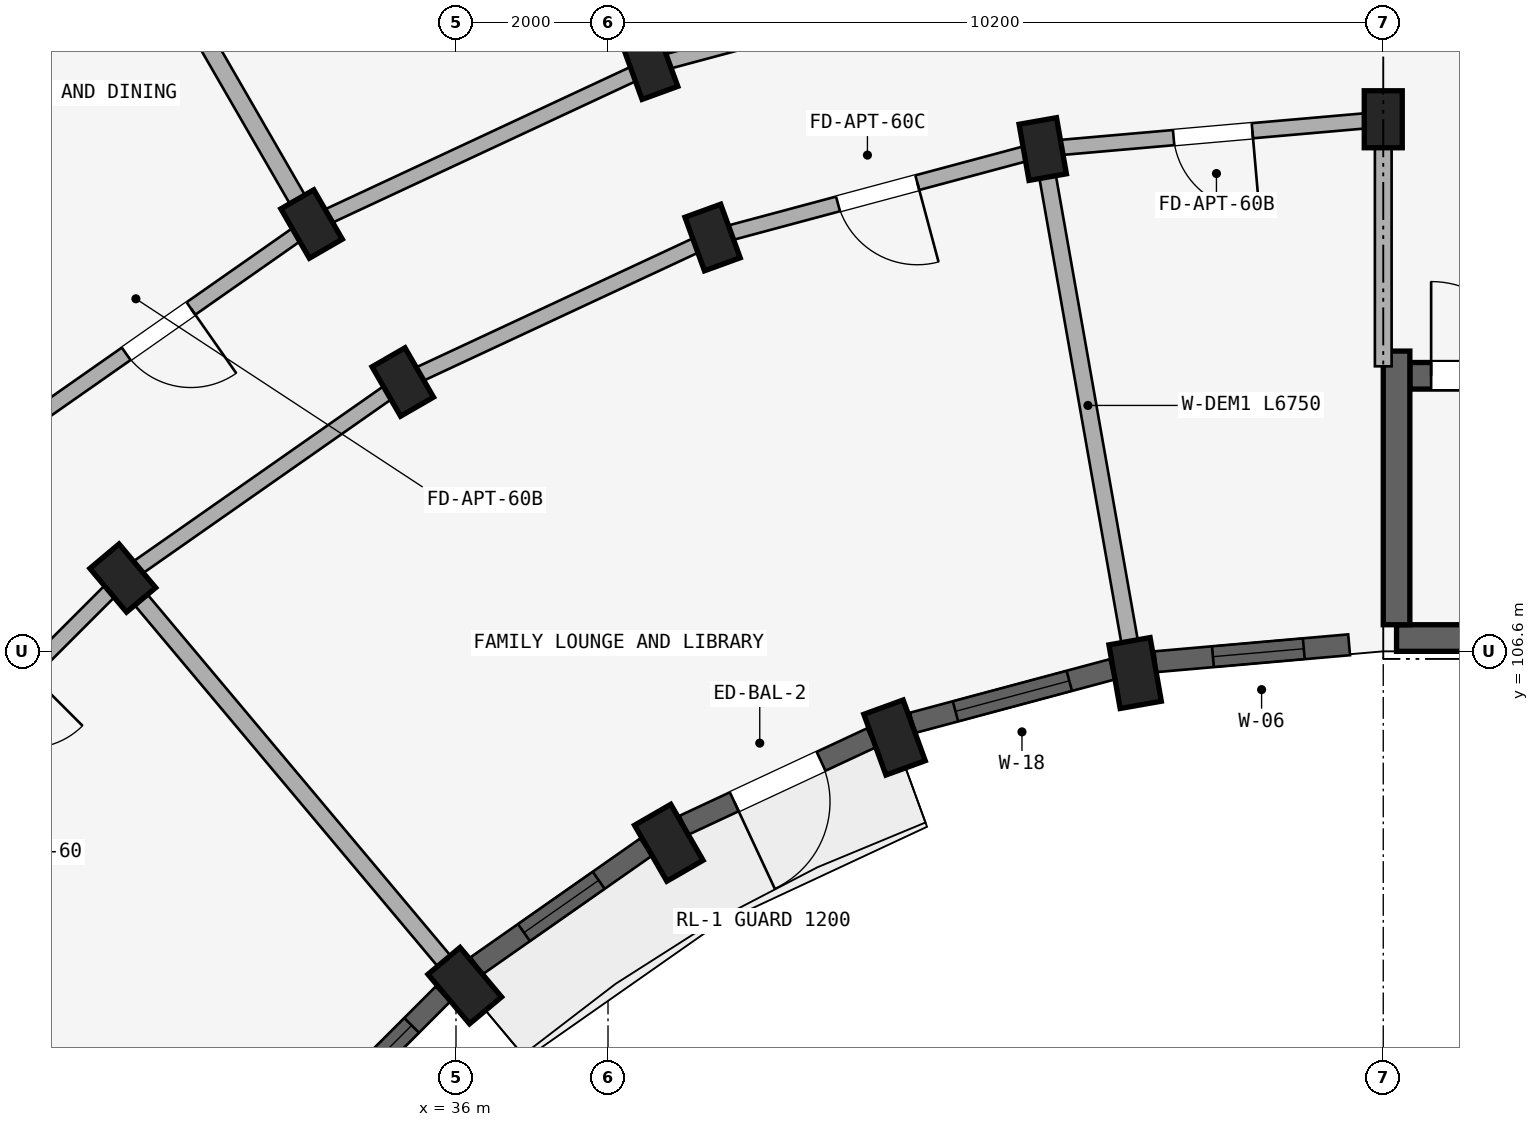
"""IFC4 building model, lengths in metres.
Left out: names, types, materials, properties, quantities, classifications, styles, units other than length and angle.
Written with IfcOpenShell. Run it as: python <this file> out.ifc"""

import sys

from ifc_helpers import new_model, si_unit, direction, frame, frame_2d, origin, origin_2d, place, context, subcontext, project, spatial, rectangle, extrude, element, fill, save


model = new_model("IFC4")
c1 = context("Model", 3, precision=1e-05, world=origin(), true_north=direction((0.0, 1.0)))
c2 = subcontext(c1, "Body", "Model", "MODEL_VIEW")
j1 = project(units=[si_unit("LENGTHUNIT", "METRE"), si_unit("PLANEANGLEUNIT", "RADIAN")], contexts=[c1])
p1 = place(None, origin())
s1 = spatial("IfcSite", under=j1, at=p1, CompositionType="ELEMENT")
p2 = place(p1, origin())
s2 = spatial("IfcBuilding", under=s1, at=p2, CompositionType="ELEMENT")
p3 = place(p2, frame((0.0, 0.0, 8.7)))
s3 = spatial("IfcBuildingStorey", under=s2, at=p3, CompositionType="ELEMENT", Elevation=8.7)
p4 = place(p3, frame((48.375, 106.775, 0.0), z_axis=(0.0, 0.0, 1.0), x_axis=(1.0, 0.0, 0.0)))
e1 = element("IfcWall", 1, at=p4, inside=s3, PredefinedType="SHEAR", context=c2, shape_type="SweptSolid", body=[
    extrude(rectangle(XDim=8.25, YDim=0.35, at=frame_2d((4.125, 0.0))), origin(), (0.0, 0.0, 1.0), 2.93),
])
p5 = place(p3, frame((48.55, 110.225, 0.0), z_axis=(0.0, 0.0, 1.0), x_axis=(1.0, 0.0, 0.0)))
e2 = element("IfcWall", 2, at=p5, inside=s3, PredefinedType="SHEAR", context=c2, shape_type="SweptSolid", body=[
    extrude(rectangle(XDim=7.9, YDim=0.35, at=frame_2d((3.95, 0.0))), origin(), (0.0, 0.0, 1.0), 2.93),
])
p6 = place(p5, frame((0.28, 0.0, 0.0)))
e3 = element("IfcOpeningElement", 3, at=p6, cuts=e2, PredefinedType="OPENING", context=c2, shape_type="SweptSolid", body=[
    extrude(rectangle(XDim=1.24, YDim=2.15, at=frame_2d((0.62, 1.075))), frame((0.0, 0.185, 0.0), z_axis=(0.0, -1.0, 0.0), x_axis=(1.0, 0.0, 0.0)), (0.0, 0.0, 1.0), 0.37),
])
p7 = place(p3, frame((48.375, 106.95, 0.0), z_axis=(0.0, 0.0, 1.0), x_axis=(0.0, 1.0, 0.0)))
e4 = element("IfcWall", 4, at=p7, inside=s3, PredefinedType="SHEAR", context=c2, shape_type="SweptSolid", body=[
    extrude(rectangle(XDim=3.6, YDim=0.35, at=frame_2d((1.8, 0.0))), origin(), (0.0, 0.0, 1.0), 2.93),
])
p8 = place(p3, frame((48.2, 113.6, 0.0), z_axis=(0.0, 0.0, 1.0), x_axis=(1.0, 0.0, 0.0)))
e5 = element("IfcColumn", 5, at=p8, inside=s3, PredefinedType="COLUMN", context=c2, shape_type="SweptSolid", body=[
    extrude(rectangle(XDim=0.5, YDim=0.75, at=origin_2d()), origin(), (0.0, 0.0, 1.0), 2.93),
])
p9 = place(p3, frame((44.935, 106.314, 0.0), z_axis=(0.0, 0.0, 1.0), x_axis=(0.984807753012, 0.173648177667, 0.0)))
e6 = element("IfcColumn", 6, at=p9, inside=s3, PredefinedType="COLUMN", context=c2, shape_type="SweptSolid", body=[
    extrude(rectangle(XDim=0.55, YDim=0.85, at=origin_2d()), origin(), (0.0, 0.0, 1.0), 2.93),
])
p10 = place(p3, frame((43.72, 113.208, 0.0), z_axis=(0.0, 0.0, 1.0), x_axis=(0.984807753012, 0.173648177667, 0.0)))
e7 = element("IfcColumn", 7, at=p10, inside=s3, PredefinedType="COLUMN", context=c2, shape_type="SweptSolid", body=[
    extrude(rectangle(XDim=0.5, YDim=0.75, at=origin_2d()), origin(), (0.0, 0.0, 1.0), 2.93),
])
p11 = place(p3, frame((41.77, 105.466, 0.0), z_axis=(0.0, 0.0, 1.0), x_axis=(0.939692620786, 0.342020143326, 0.0)))
e8 = element("IfcColumn", 8, at=p11, inside=s3, PredefinedType="COLUMN", context=c2, shape_type="SweptSolid", body=[
    extrude(rectangle(XDim=0.55, YDim=0.85, at=origin_2d()), origin(), (0.0, 0.0, 1.0), 2.93),
])
for number, where, z_axis, x_axis in (
    (9, (39.376, 112.044, 0.0), (0.0, 0.0, 1.0), (0.94, 0.342, 0.0)),
    (10, (38.555, 114.299, 0.0), (0.0, 0.0, 1.0), (0.94, 0.342, 0.0)),
):
    element("IfcColumn", number, at=place(p3, frame(where, z_axis=z_axis, x_axis=x_axis)), inside=s3, PredefinedType="COLUMN", context=c2, shape_type="SweptSolid", body=[
        extrude(rectangle(XDim=0.5, YDim=0.75, at=origin_2d()), origin(), (0.0, 0.0, 1.0), 2.93),
    ])
p12 = place(p3, frame((38.8, 104.081, 0.0), z_axis=(0.0, 0.0, 1.0), x_axis=(0.866025403784, 0.5, 0.0)))
e11 = element("IfcColumn", 11, at=p12, inside=s3, PredefinedType="COLUMN", context=c2, shape_type="SweptSolid", body=[
    extrude(rectangle(XDim=0.55, YDim=0.85, at=origin_2d()), origin(), (0.0, 0.0, 1.0), 2.93),
])
for number, where, z_axis, x_axis in (
    (12, (35.3, 110.144, 0.0), (0.0, 0.0, 1.0), (0.866, 0.5, 0.0)),
    (13, (34.1, 112.222, 0.0), (0.0, 0.0, 1.0), (0.866, 0.5, 0.0)),
):
    element("IfcColumn", number, at=place(p3, frame(where, z_axis=z_axis, x_axis=x_axis)), inside=s3, PredefinedType="COLUMN", context=c2, shape_type="SweptSolid", body=[
        extrude(rectangle(XDim=0.5, YDim=0.75, at=origin_2d()), origin(), (0.0, 0.0, 1.0), 2.93),
    ])
p13 = place(p3, frame((36.115, 102.202, 0.0), z_axis=(0.0, 0.0, 1.0), x_axis=(0.766044443119, 0.642787609687, 0.0)))
e14 = element("IfcColumn", 14, at=p13, inside=s3, PredefinedType="COLUMN", context=c2, shape_type="SweptSolid", body=[
    extrude(rectangle(XDim=0.55, YDim=0.85, at=origin_2d()), origin(), (0.0, 0.0, 1.0), 2.93),
])
p14 = place(p3, frame((31.616, 107.564, 0.0), z_axis=(0.0, 0.0, 1.0), x_axis=(0.766044443119, 0.642787609687, 0.0)))
e15 = element("IfcColumn", 15, at=p14, inside=s3, PredefinedType="COLUMN", context=c2, shape_type="SweptSolid", body=[
    extrude(rectangle(XDim=0.5, YDim=0.75, at=origin_2d()), origin(), (0.0, 0.0, 1.0), 2.93),
])
p15 = place(p3, frame((48.2, 113.6, 0.0), z_axis=(0.0, 0.0, 1.0), x_axis=(-0.996191949488, -0.087187153726, 0.0)))
e16 = element("IfcWall", 16, at=p15, inside=s3, PredefinedType="STANDARD", context=c2, shape_type="SweptSolid", body=[
    extrude(rectangle(XDim=4.497, YDim=0.2, at=frame_2d((2.249, 0.0))), origin(), (0.0, 0.0, 1.0), 2.372),
])
p16 = place(p15, frame((1.729, 0.0, 0.0)))
e17 = element("IfcOpeningElement", 17, at=p16, cuts=e16, PredefinedType="OPENING", context=c2, shape_type="SweptSolid", body=[
    extrude(rectangle(XDim=1.04, YDim=2.15, at=frame_2d((0.52, 1.075))), frame((0.0, 0.11, 0.0), z_axis=(0.0, -1.0, 0.0), x_axis=(1.0, 0.0, 0.0)), (0.0, 0.0, 1.0), 0.22),
])
p17 = place(p3, frame((43.72, 113.208, 0.0), z_axis=(0.0, 0.0, 1.0), x_axis=(-0.965934240054, -0.258787642463, 0.0)))
e18 = element("IfcWall", 18, at=p17, inside=s3, PredefinedType="STANDARD", context=c2, shape_type="SweptSolid", body=[
    extrude(rectangle(XDim=4.497, YDim=0.2, at=frame_2d((2.249, 0.0))), origin(), (0.0, 0.0, 1.0), 2.372),
])
p18 = place(p17, frame((1.709, 0.0, 0.0)))
e19 = element("IfcOpeningElement", 19, at=p18, cuts=e18, PredefinedType="OPENING", context=c2, shape_type="SweptSolid", body=[
    extrude(rectangle(XDim=1.08, YDim=2.15, at=frame_2d((0.54, 1.075))), frame((0.0, 0.11, 0.0), z_axis=(0.0, -1.0, 0.0), x_axis=(1.0, 0.0, 0.0)), (0.0, 0.0, 1.0), 0.22),
])
p19 = place(p3, frame((43.303, 115.572, 0.0), z_axis=(0.0, 0.0, 1.0), x_axis=(-0.965930095386, -0.258803112091, 0.0)))
e20 = element("IfcWall", 20, at=p19, inside=s3, PredefinedType="STANDARD", context=c2, shape_type="SweptSolid", body=[
    extrude(rectangle(XDim=4.916, YDim=0.2, at=frame_2d((2.458, 0.0))), origin(), (0.0, 0.0, 1.0), 2.372),
])
p20 = place(p3, frame((39.376, 112.044, 0.0), z_axis=(0.0, 0.0, 1.0), x_axis=(-0.906307919131, -0.422617978463, 0.0)))
e21 = element("IfcWall", 21, at=p20, inside=s3, PredefinedType="STANDARD", context=c2, shape_type="SweptSolid", body=[
    extrude(rectangle(XDim=4.497, YDim=0.2, at=frame_2d((2.249, 0.0))), origin(), (0.0, 0.0, 1.0), 2.372),
])
p21 = place(p3, frame((38.555, 114.299, 0.0), z_axis=(0.0, 0.0, 1.0), x_axis=(-0.906302381024, -0.422629854778, 0.0)))
e22 = element("IfcWall", 22, at=p21, inside=s3, PredefinedType="STANDARD", context=c2, shape_type="SweptSolid", body=[
    extrude(rectangle(XDim=4.915, YDim=0.2, at=frame_2d((2.458, 0.0))), origin(), (0.0, 0.0, 1.0), 2.372),
])
p22 = place(p3, frame((35.3, 110.144, 0.0), z_axis=(0.0, 0.0, 1.0), x_axis=(-0.819155404658, -0.573571637217, 0.0)))
e23 = element("IfcWall", 23, at=p22, inside=s3, PredefinedType="STANDARD", context=c2, shape_type="SweptSolid", body=[
    extrude(rectangle(XDim=4.497, YDim=0.2, at=frame_2d((2.249, 0.0))), origin(), (0.0, 0.0, 1.0), 2.372),
])
p23 = place(p3, frame((34.1, 112.222, 0.0), z_axis=(0.0, 0.0, 1.0), x_axis=(-0.819140911474, -0.573592335331, 0.0)))
e24 = element("IfcWall", 24, at=p23, inside=s3, PredefinedType="STANDARD", context=c2, shape_type="SweptSolid", body=[
    extrude(rectangle(XDim=4.916, YDim=0.2, at=frame_2d((2.458, 0.0))), origin(), (0.0, 0.0, 1.0), 2.372),
])
p24 = place(p23, frame((1.938, 0.0, 0.0)))
e25 = element("IfcOpeningElement", 25, at=p24, cuts=e24, PredefinedType="OPENING", context=c2, shape_type="SweptSolid", body=[
    extrude(rectangle(XDim=1.04, YDim=2.15, at=frame_2d((0.52, 1.075))), frame((0.0, 0.11, 0.0), z_axis=(0.0, -1.0, 0.0), x_axis=(1.0, 0.0, 0.0)), (0.0, 0.0, 1.0), 0.22),
])
p25 = place(p3, frame((31.616, 107.564, 0.0), z_axis=(0.0, 0.0, 1.0), x_axis=(-0.707106781187, -0.707106781187, 0.0)))
e26 = element("IfcWall", 26, at=p25, inside=s3, PredefinedType="STANDARD", context=c2, shape_type="SweptSolid", body=[
    extrude(rectangle(XDim=4.497, YDim=0.2, at=frame_2d((2.249, 0.0))), origin(), (0.0, 0.0, 1.0), 2.372),
])
p26 = place(p25, frame((1.749, 0.0, 0.0)))
e27 = element("IfcOpeningElement", 27, at=p26, cuts=e26, PredefinedType="OPENING", context=c2, shape_type="SweptSolid", body=[
    extrude(rectangle(XDim=1.0, YDim=2.15, at=frame_2d((0.5, 1.075))), frame((0.0, 0.11, 0.0), z_axis=(0.0, -1.0, 0.0), x_axis=(1.0, 0.0, 0.0)), (0.0, 0.0, 1.0), 0.22),
])
p27 = place(p3, frame((48.2, 110.35, 0.0), z_axis=(0.0, 0.0, 1.0), x_axis=(0.0, 1.0, 0.0)))
e28 = element("IfcWall", 28, at=p27, inside=s3, PredefinedType="STANDARD", context=c2, shape_type="SweptSolid", body=[
    extrude(rectangle(XDim=3.2, YDim=0.22, at=frame_2d((1.6, 0.0))), origin(), (0.0, 0.0, 1.0), 2.372),
])
p28 = place(p3, frame((44.901, 106.511, 0.0), z_axis=(0.0, 0.0, 1.0), x_axis=(-0.173647089161, 0.984807944945, 0.0)))
e29 = element("IfcWall", 29, at=p28, inside=s3, PredefinedType="STANDARD", context=c2, shape_type="SweptSolid", body=[
    extrude(rectangle(XDim=6.75, YDim=0.22, at=frame_2d((3.375, 0.0))), origin(), (0.0, 0.0, 1.0), 2.372),
])
p29 = place(p3, frame((38.521, 114.393, 0.0), z_axis=(0.0, 0.0, 1.0), x_axis=(-0.342022120477, 0.939691901159, 0.0)))
e30 = element("IfcWall", 30, at=p29, inside=s3, PredefinedType="PARTITIONING", context=c2, shape_type="SweptSolid", body=[
    extrude(rectangle(XDim=17.42, YDim=0.15, at=frame_2d((8.71, 0.0))), origin(), (0.0, 0.0, 1.0), 2.372),
])
p30 = place(p29, frame((4.45, 0.0, 0.0)))
e31 = element("IfcOpeningElement", 31, at=p30, cuts=e30, PredefinedType="OPENING", context=c2, shape_type="SweptSolid", body=[
    extrude(rectangle(XDim=0.8, YDim=2.1, at=frame_2d((0.4, 1.05))), frame((0.0, 0.085, 0.0), z_axis=(0.0, -1.0, 0.0), x_axis=(1.0, 0.0, 0.0)), (0.0, 0.0, 1.0), 0.17),
])
p31 = place(p3, frame((34.05, 112.309, 0.0), z_axis=(0.0, 0.0, 1.0), x_axis=(-0.499997843263, 0.866026648973, 0.0)))
e32 = element("IfcWall", 32, at=p31, inside=s3, PredefinedType="STANDARD", context=c2, shape_type="SweptSolid", body=[
    extrude(rectangle(XDim=17.42, YDim=0.23, at=frame_2d((8.71, 0.0))), origin(), (0.0, 0.0, 1.0), 2.372),
])
p32 = place(p3, frame((35.987, 102.355, 0.0), z_axis=(0.0, 0.0, 1.0), x_axis=(-0.642784846501, 0.766046761698, 0.0)))
e33 = element("IfcWall", 33, at=p32, inside=s3, PredefinedType="STANDARD", context=c2, shape_type="SweptSolid", body=[
    extrude(rectangle(XDim=6.75, YDim=0.22, at=frame_2d((3.375, 0.0))), origin(), (0.0, 0.0, 1.0), 2.372),
])
p33 = place(p3, frame((30.8, 117.938, 0.0), z_axis=(0.0, 0.0, 1.0), x_axis=(-0.81913926159, -0.573594691504, 0.0)))
e34 = element("IfcWall", 34, at=p33, inside=s3, PredefinedType="PLUMBINGWALL", context=c2, shape_type="SweptSolid", body=[
    extrude(rectangle(XDim=6.066, YDim=0.15, at=frame_2d((3.033, 0.0))), origin(), (0.0, 0.0, 1.0), 2.372),
])
p34 = place(p33, frame((2.653, 0.0, 0.0)))
e35 = element("IfcOpeningElement", 35, at=p34, cuts=e34, PredefinedType="OPENING", context=c2, shape_type="SweptSolid", body=[
    extrude(rectangle(XDim=0.76, YDim=2.05, at=frame_2d((0.38, 1.025))), frame((0.0, 0.085, 0.0), z_axis=(0.0, -1.0, 0.0), x_axis=(1.0, 0.0, 0.0)), (0.0, 0.0, 1.0), 0.17),
])
p35 = place(p3, frame((47.751, 106.686, 0.0), z_axis=(0.0, 0.0, 1.0), x_axis=(-0.996194235595, -0.08716102895, 0.0)))
e36 = element("IfcWall", 36, at=p35, inside=s3, PredefinedType="STANDARD", context=c2, shape_type="SweptSolid", body=[
    extrude(rectangle(XDim=2.557, YDim=0.275, at=frame_2d((1.279, 0.0))), origin(), (0.0, 0.0, 1.0), 2.472),
])
p36 = place(p35, frame((0.599, 0.0, 0.772)))
e37 = element("IfcOpeningElement", 37, at=p36, cuts=e36, PredefinedType="OPENING", context=c2, shape_type="SweptSolid", body=[
    extrude(rectangle(XDim=1.2, YDim=1.5, at=frame_2d((0.6, 0.75))), frame((0.0, 0.147, 0.0), z_axis=(0.0, -1.0, 0.0), x_axis=(1.0, 0.0, 0.0)), (0.0, 0.0, 1.0), 0.295),
])
p37 = place(p3, frame((44.633, 106.363, 0.0), z_axis=(0.0, 0.0, 1.0), x_axis=(-0.965925595341, -0.258819907011, 0.0)))
e38 = element("IfcWall", 38, at=p37, inside=s3, PredefinedType="STANDARD", context=c2, shape_type="SweptSolid", body=[
    extrude(rectangle(XDim=2.718, YDim=0.275, at=frame_2d((1.359, 0.0))), origin(), (0.0, 0.0, 1.0), 2.472),
])
p38 = place(p37, frame((0.584, 0.0, 0.672)))
e39 = element("IfcOpeningElement", 39, at=p38, cuts=e38, PredefinedType="OPENING", context=c2, shape_type="SweptSolid", body=[
    extrude(rectangle(XDim=1.55, YDim=1.6, at=frame_2d((0.775, 0.8))), frame((0.0, 0.147, 0.0), z_axis=(0.0, -1.0, 0.0), x_axis=(1.0, 0.0, 0.0)), (0.0, 0.0, 1.0), 0.295),
])
p39 = place(p3, frame((41.464, 105.461, 0.0), z_axis=(0.0, 0.0, 1.0), x_axis=(-0.906311629168, -0.422610022166, 0.0)))
e40 = element("IfcWall", 40, at=p39, inside=s3, PredefinedType="STANDARD", context=c2, shape_type="SweptSolid", body=[
    extrude(rectangle(XDim=2.718, YDim=0.275, at=frame_2d((1.359, 0.0))), origin(), (0.0, 0.0, 1.0), 2.472),
])
p40 = place(p39, frame((0.729, 0.0, 0.0)))
e41 = element("IfcOpeningElement", 41, at=p40, cuts=e40, PredefinedType="OPENING", context=c2, shape_type="SweptSolid", body=[
    extrude(rectangle(XDim=1.26, YDim=2.15, at=frame_2d((0.63, 1.075))), frame((0.0, 0.147, 0.0), z_axis=(0.0, -1.0, 0.0), x_axis=(1.0, 0.0, 0.0)), (0.0, 0.0, 1.0), 0.295),
])
p41 = place(p3, frame((38.499, 104.023, 0.0), z_axis=(0.0, 0.0, 1.0), x_axis=(-0.81917282593, -0.573546755948, 0.0)))
e42 = element("IfcWall", 42, at=p41, inside=s3, PredefinedType="STANDARD", context=c2, shape_type="SweptSolid", body=[
    extrude(rectangle(XDim=2.718, YDim=0.275, at=frame_2d((1.359, 0.0))), origin(), (0.0, 0.0, 1.0), 2.472),
])
p42 = place(p41, frame((0.759, 0.0, 0.772)))
e43 = element("IfcOpeningElement", 43, at=p42, cuts=e42, PredefinedType="OPENING", context=c2, shape_type="SweptSolid", body=[
    extrude(rectangle(XDim=1.2, YDim=1.5, at=frame_2d((0.6, 0.75))), frame((0.0, 0.147, 0.0), z_axis=(0.0, -1.0, 0.0), x_axis=(1.0, 0.0, 0.0)), (0.0, 0.0, 1.0), 0.295),
])
p43 = place(p3, frame((35.829, 102.092, 0.0), z_axis=(0.0, 0.0, 1.0), x_axis=(-0.707106781187, -0.707106781187, 0.0)))
e44 = element("IfcWall", 44, at=p43, inside=s3, PredefinedType="STANDARD", context=c2, shape_type="SweptSolid", body=[
    extrude(rectangle(XDim=2.718, YDim=0.275, at=frame_2d((1.359, 0.0))), origin(), (0.0, 0.0, 1.0), 2.472),
])
p44 = place(p43, frame((0.584, 0.0, 0.672)))
e45 = element("IfcOpeningElement", 45, at=p44, cuts=e44, PredefinedType="OPENING", context=c2, shape_type="SweptSolid", body=[
    extrude(rectangle(XDim=1.55, YDim=1.6, at=frame_2d((0.775, 0.8))), frame((0.0, 0.147, 0.0), z_axis=(0.0, -1.0, 0.0), x_axis=(1.0, 0.0, 0.0)), (0.0, 0.0, 1.0), 0.295),
])
p45 = place(p36, origin())
e46 = element("IfcWindow", 46, at=p45, inside=s3, PartitioningType="SINGLE_PANEL", PredefinedType="WINDOW", context=c2, shape_type="SweptSolid", body=[
    extrude(rectangle(XDim=1.2, YDim=1.5, at=frame_2d((0.6, 0.75))), frame((0.0, 0.03, 0.0), z_axis=(0.0, -1.0, 0.0), x_axis=(1.0, 0.0, 0.0)), (0.0, 0.0, 1.0), 0.06),
])
fill(e37, e46)
p46 = place(p38, origin())
e47 = element("IfcWindow", 47, at=p46, inside=s3, PartitioningType="DOUBLE_PANEL_VERTICAL", PredefinedType="WINDOW", context=c2, shape_type="SweptSolid", body=[
    extrude(rectangle(XDim=1.55, YDim=1.6, at=frame_2d((0.775, 0.8))), frame((0.0, 0.03, 0.0), z_axis=(0.0, -1.0, 0.0), x_axis=(1.0, 0.0, 0.0)), (0.0, 0.0, 1.0), 0.06),
])
fill(e39, e47)
p47 = place(p42, origin())
e48 = element("IfcWindow", 48, at=p47, inside=s3, PartitioningType="SINGLE_PANEL", PredefinedType="WINDOW", context=c2, shape_type="SweptSolid", body=[
    extrude(rectangle(XDim=1.2, YDim=1.5, at=frame_2d((0.6, 0.75))), frame((0.0, 0.03, 0.0), z_axis=(0.0, -1.0, 0.0), x_axis=(1.0, 0.0, 0.0)), (0.0, 0.0, 1.0), 0.06),
])
fill(e43, e48)
p48 = place(p44, origin())
e49 = element("IfcWindow", 49, at=p48, inside=s3, PartitioningType="DOUBLE_PANEL_VERTICAL", PredefinedType="WINDOW", context=c2, shape_type="SweptSolid", body=[
    extrude(rectangle(XDim=1.55, YDim=1.6, at=frame_2d((0.775, 0.8))), frame((0.0, 0.03, 0.0), z_axis=(0.0, -1.0, 0.0), x_axis=(1.0, 0.0, 0.0)), (0.0, 0.0, 1.0), 0.06),
])
fill(e45, e49)
p49 = place(p6, frame((1.24, 0.0, 0.0), z_axis=(0.0, 0.0, 1.0), x_axis=(-1.0, 0.0, 0.0)))
e50 = element("IfcDoor", 50, at=p49, inside=s3, OperationType="SINGLE_SWING_RIGHT", PredefinedType="DOOR", context=c2, shape_type="SweptSolid", body=[
    extrude(rectangle(XDim=1.24, YDim=2.15, at=frame_2d((0.62, 1.075))), frame((0.0, 0.025, 0.0), z_axis=(0.0, -1.0, 0.0), x_axis=(1.0, 0.0, 0.0)), (0.0, 0.0, 1.0), 0.05),
])
fill(e3, e50)
p50 = place(p24, origin())
e51 = element("IfcDoor", 51, at=p50, inside=s3, OperationType="SINGLE_SWING_LEFT", PredefinedType="DOOR", context=c2, shape_type="SweptSolid", body=[
    extrude(rectangle(XDim=1.04, YDim=2.15, at=frame_2d((0.52, 1.075))), frame((0.0, 0.025, 0.0), z_axis=(0.0, -1.0, 0.0), x_axis=(1.0, 0.0, 0.0)), (0.0, 0.0, 1.0), 0.05),
])
fill(e25, e51)
p51 = place(p16, frame((1.04, 0.0, 0.0), z_axis=(0.0, 0.0, 1.0), x_axis=(-1.0, 0.0, 0.0)))
e52 = element("IfcDoor", 52, at=p51, inside=s3, OperationType="SINGLE_SWING_RIGHT", PredefinedType="DOOR", context=c2, shape_type="SweptSolid", body=[
    extrude(rectangle(XDim=1.04, YDim=2.15, at=frame_2d((0.52, 1.075))), frame((0.0, 0.025, 0.0), z_axis=(0.0, -1.0, 0.0), x_axis=(1.0, 0.0, 0.0)), (0.0, 0.0, 1.0), 0.05),
])
fill(e17, e52)
p52 = place(p18, origin())
e53 = element("IfcDoor", 53, at=p52, inside=s3, OperationType="SINGLE_SWING_LEFT", PredefinedType="DOOR", context=c2, shape_type="SweptSolid", body=[
    extrude(rectangle(XDim=1.08, YDim=2.15, at=frame_2d((0.54, 1.075))), frame((0.0, 0.025, 0.0), z_axis=(0.0, -1.0, 0.0), x_axis=(1.0, 0.0, 0.0)), (0.0, 0.0, 1.0), 0.05),
])
fill(e19, e53)
p53 = place(p40, origin())
e54 = element("IfcDoor", 54, at=p53, inside=s3, OperationType="SINGLE_SWING_RIGHT", PredefinedType="DOOR", context=c2, shape_type="SweptSolid", body=[
    extrude(rectangle(XDim=1.26, YDim=2.15, at=frame_2d((0.63, 1.075))), frame((0.0, 0.025, 0.0), z_axis=(0.0, -1.0, 0.0), x_axis=(1.0, 0.0, 0.0)), (0.0, 0.0, 1.0), 0.05),
])
fill(e41, e54)
save(model, sys.argv[1])
